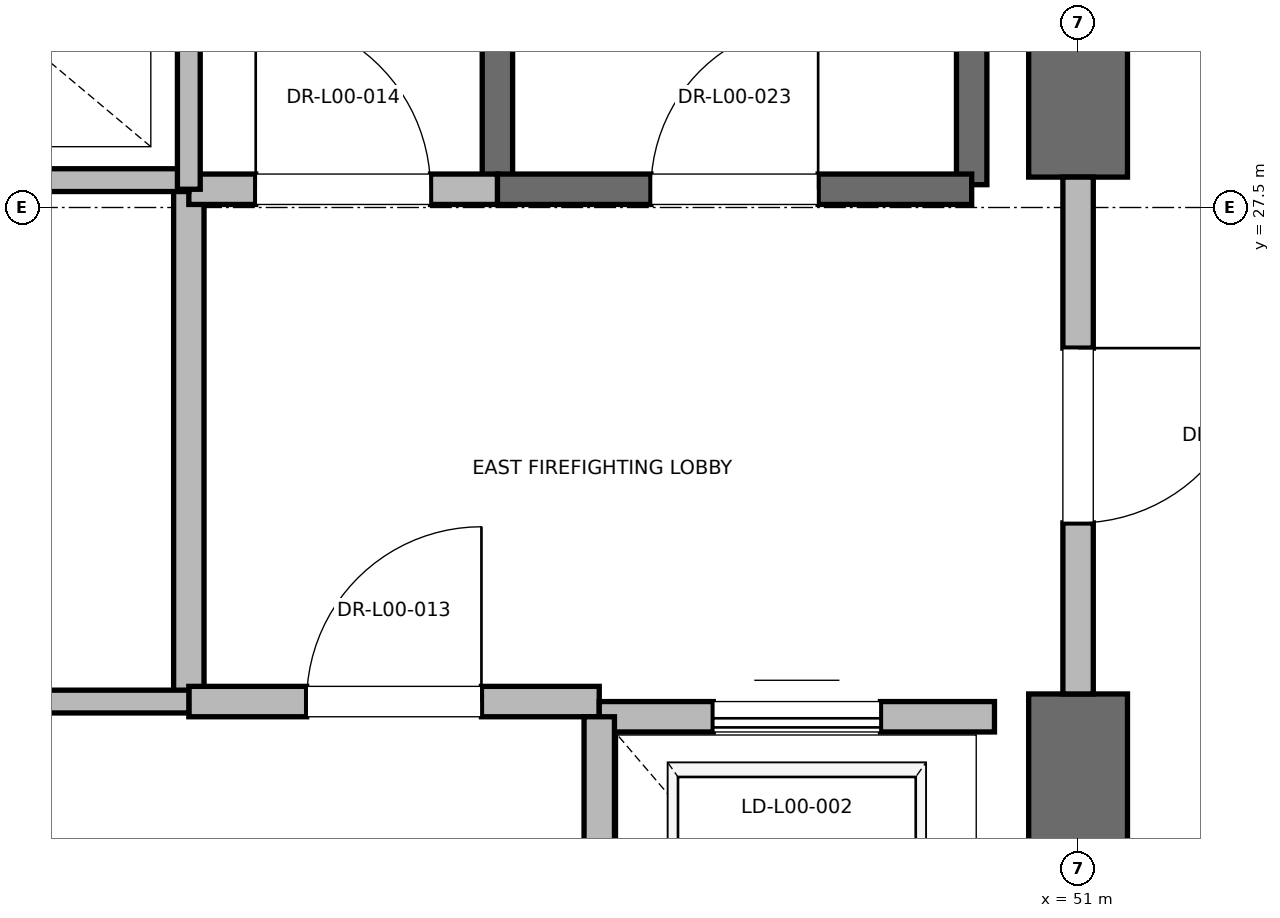
"""IFC4 building model, lengths in metres.
Left out: names, types, materials, properties, quantities, classifications, styles, units other than length and angle.
Written with IfcOpenShell. Run it as: python <this file> out.ifc"""

import sys

from ifc_helpers import new_model, si_unit, direction, frame, frame_2d, origin, place, context, subcontext, project, spatial, rectangle, extrude, element, fill, save


model = new_model("IFC4")
c1 = context("Model", 3, precision=1e-05, world=origin(), true_north=direction((0.0, 1.0)))
c2 = subcontext(c1, "Body", "Model", "MODEL_VIEW")
j1 = project(units=[si_unit("LENGTHUNIT", "METRE"), si_unit("PLANEANGLEUNIT", "RADIAN")], contexts=[c1])
p1 = place(None, origin())
s1 = spatial("IfcSite", under=j1, at=p1, CompositionType="ELEMENT")
p2 = place(p1, origin())
s2 = spatial("IfcBuilding", under=s1, at=p2, CompositionType="ELEMENT")
p3 = place(p2, origin())
s3 = spatial("IfcBuildingStorey", under=s2, at=p3, CompositionType="ELEMENT", Elevation=0.0)
p4 = place(p3, frame((51.0, 18.5, 0.0), z_axis=(0.0, 0.0, 1.0), x_axis=(0.0, 1.0, 0.0)))
e1 = element("IfcWall", 1, at=p4, inside=s3, PredefinedType="SHEAR", context=c2, shape_type="SweptSolid", body=[
    extrude(rectangle(XDim=5.8, YDim=0.65, at=frame_2d((2.9, 0.0))), origin(), (0.0, 0.0, 1.0), 5.72),
])
p5 = place(p3, frame((51.0, 27.7, 0.0), z_axis=(0.0, 0.0, 1.0), x_axis=(0.0, 1.0, 0.0)))
e2 = element("IfcWall", 2, at=p5, inside=s3, PredefinedType="SHEAR", context=c2, shape_type="SweptSolid", body=[
    extrude(rectangle(XDim=8.8, YDim=0.65, at=frame_2d((4.4, 0.0))), origin(), (0.0, 0.0, 1.0), 5.72),
])
p6 = place(p3, frame((50.3, 27.65, 0.0), z_axis=(0.0, 0.0, 1.0), x_axis=(0.0, 1.0, 0.0)))
e3 = element("IfcWall", 3, at=p6, inside=s3, PredefinedType="SOLIDWALL", context=c2, shape_type="SweptSolid", body=[
    extrude(rectangle(XDim=8.15, YDim=0.2, at=frame_2d((4.075, 0.0))), origin(), (0.0, 0.0, 1.0), 5.72),
])
p7 = place(p3, frame((47.18, 27.62, 0.0), z_axis=(0.0, 0.0, 1.0), x_axis=(0.0, 1.0, 0.0)))
e4 = element("IfcWall", 4, at=p7, inside=s3, PredefinedType="SOLIDWALL", context=c2, shape_type="SweptSolid", body=[
    extrude(rectangle(XDim=8.18, YDim=0.2, at=frame_2d((4.09, 0.0))), origin(), (0.0, 0.0, 1.0), 5.72),
])
p8 = place(p3, frame((47.18, 27.62, 0.0), z_axis=(0.0, 0.0, 1.0), x_axis=(1.0, 0.0, 0.0)))
e5 = element("IfcWall", 5, at=p8, inside=s3, PredefinedType="SOLIDWALL", context=c2, shape_type="SweptSolid", body=[
    extrude(rectangle(XDim=3.12, YDim=0.2, at=frame_2d((1.56, 0.0))), origin(), (0.0, 0.0, 1.0), 5.72),
])
p9 = place(p8, frame((1.01, 0.0, 0.0)))
e6 = element("IfcOpeningElement", 6, at=p9, cuts=e5, PredefinedType="OPENING", context=c2, shape_type="SweptSolid", body=[
    extrude(rectangle(XDim=1.1, YDim=2.15, at=frame_2d((0.55, 1.075))), frame((0.0, 0.1, 0.0), z_axis=(0.0, -1.0, 0.0), x_axis=(1.0, 0.0, 0.0)), (0.0, 0.0, 1.0), 0.2),
])
p10 = place(p3, frame((45.15, 24.25, 0.0), z_axis=(0.0, 0.0, 1.0), x_axis=(0.0, 1.0, 0.0)))
e7 = element("IfcWall", 7, at=p10, inside=s3, PredefinedType="PARTITIONING", context=c2, shape_type="SweptSolid", body=[
    extrude(rectangle(XDim=3.37, YDim=0.2, at=frame_2d((1.685, 0.0))), origin(), (0.0, 0.0, 1.0), 5.72),
])
p11 = place(p3, frame((45.15, 24.25, 0.0), z_axis=(0.0, 0.0, 1.0), x_axis=(1.0, 0.0, 0.0)))
e8 = element("IfcWall", 8, at=p11, inside=s3, PredefinedType="PARTITIONING", context=c2, shape_type="SweptSolid", body=[
    extrude(rectangle(XDim=2.7, YDim=0.2, at=frame_2d((1.35, 0.0))), origin(), (0.0, 0.0, 1.0), 5.72),
])
p12 = place(p11, frame((0.775, 0.0, 0.0)))
e9 = element("IfcOpeningElement", 9, at=p12, cuts=e8, PredefinedType="OPENING", context=c2, shape_type="SweptSolid", body=[
    extrude(rectangle(XDim=1.15, YDim=2.2, at=frame_2d((0.575, 1.1))), frame((0.0, 0.1, 0.0), z_axis=(0.0, -1.0, 0.0), x_axis=(1.0, 0.0, 0.0)), (0.0, 0.0, 1.0), 0.2),
])
p13 = place(p3, frame((45.15, 27.62, 0.0), z_axis=(0.0, 0.0, 1.0), x_axis=(1.0, 0.0, 0.0)))
e10 = element("IfcWall", 10, at=p13, inside=s3, PredefinedType="PARTITIONING", context=c2, shape_type="SweptSolid", body=[
    extrude(rectangle(XDim=2.03, YDim=0.2, at=frame_2d((1.015, 0.0))), origin(), (0.0, 0.0, 1.0), 5.72),
])
p14 = place(p13, frame((0.44, 0.0, 0.0)))
e11 = element("IfcOpeningElement", 11, at=p14, cuts=e10, PredefinedType="OPENING", context=c2, shape_type="SweptSolid", body=[
    extrude(rectangle(XDim=1.15, YDim=2.2, at=frame_2d((0.575, 1.1))), frame((0.0, 0.1, 0.0), z_axis=(0.0, -1.0, 0.0), x_axis=(1.0, 0.0, 0.0)), (0.0, 0.0, 1.0), 0.2),
])
p15 = place(p3, frame((51.0, 27.7, 0.0), z_axis=(0.0, 0.0, 1.0), x_axis=(0.0, -1.0, 0.0)))
e12 = element("IfcWall", 12, at=p15, inside=s3, PredefinedType="PARTITIONING", context=c2, shape_type="SweptSolid", body=[
    extrude(rectangle(XDim=3.4, YDim=0.2, at=frame_2d((1.7, 0.0))), origin(), (0.0, 0.0, 1.0), 4.5),
])
p16 = place(p15, frame((1.125, 0.0, 0.0)))
e13 = element("IfcOpeningElement", 13, at=p16, cuts=e12, PredefinedType="OPENING", context=c2, shape_type="SweptSolid", body=[
    extrude(rectangle(XDim=1.15, YDim=2.2, at=frame_2d((0.575, 1.1))), frame((0.0, 0.1, 0.0), z_axis=(0.0, -1.0, 0.0), x_axis=(1.0, 0.0, 0.0)), (0.0, 0.0, 1.0), 0.2),
])
p17 = place(p3, frame((50.45, 24.15, 0.0), z_axis=(0.0, 0.0, 1.0), x_axis=(-1.0, 0.0, 0.0)))
e14 = element("IfcWall", 14, at=p17, inside=s3, PredefinedType="SOLIDWALL", context=c2, shape_type="SweptSolid", body=[
    extrude(rectangle(XDim=2.6, YDim=0.2, at=frame_2d((1.3, 0.0))), origin(), (0.0, 0.0, 1.0), 4.5),
])
p18 = place(p17, frame((0.75, 0.0, 0.0)))
e15 = element("IfcOpeningElement", 15, at=p18, cuts=e14, PredefinedType="OPENING", context=c2, shape_type="SweptSolid", body=[
    extrude(rectangle(XDim=1.1, YDim=2.2, at=frame_2d((0.55, 1.1))), frame((0.0, 0.1, 0.0), z_axis=(0.0, -1.0, 0.0), x_axis=(1.0, 0.0, 0.0)), (0.0, 0.0, 1.0), 0.2),
])
p19 = place(p3, frame((47.85, 24.15, 0.0), z_axis=(0.0, 0.0, 1.0), x_axis=(0.0, -1.0, 0.0)))
e16 = element("IfcWall", 16, at=p19, inside=s3, PredefinedType="SOLIDWALL", context=c2, shape_type="SweptSolid", body=[
    extrude(rectangle(XDim=3.0, YDim=0.2, at=frame_2d((1.5, 0.0))), origin(), (0.0, 0.0, 1.0), 5.72),
])
p20 = place(p3, frame((41.56, 27.68, 0.0), z_axis=(0.0, 0.0, 1.0), x_axis=(1.0, 0.0, 0.0)))
e17 = element("IfcWall", 17, at=p20, inside=s3, PredefinedType="PARTITIONING", context=c2, shape_type="SweptSolid", body=[
    extrude(rectangle(XDim=3.59, YDim=0.15, at=frame_2d((1.795, 0.0))), origin(), (0.0, 0.0, 1.0), 2.85),
])
p21 = place(p3, frame((41.76, 24.25, 0.0), z_axis=(0.0, 0.0, 1.0), x_axis=(1.0, 0.0, 0.0)))
e18 = element("IfcWall", 18, at=p21, inside=s3, PredefinedType="PARTITIONING", context=c2, shape_type="SweptSolid", body=[
    extrude(rectangle(XDim=3.39, YDim=0.15, at=frame_2d((1.695, 0.0))), origin(), (0.0, 0.0, 1.0), 2.85),
])
p22 = place(p21, frame((1.195, 0.0, 0.0)))
e19 = element("IfcOpeningElement", 19, at=p22, cuts=e18, PredefinedType="OPENING", context=c2, shape_type="SweptSolid", body=[
    extrude(rectangle(XDim=1.0, YDim=2.15, at=frame_2d((0.5, 1.075))), frame((0.0, 0.075, 0.0), z_axis=(0.0, -1.0, 0.0), x_axis=(1.0, 0.0, 0.0)), (0.0, 0.0, 1.0), 0.15),
])
p23 = place(p3, frame((45.15, 27.62, 0.0), z_axis=(0.0, 0.0, 1.0), x_axis=(0.0, 1.0, 0.0)))
e20 = element("IfcWall", 20, at=p23, inside=s3, PredefinedType="PARTITIONING", context=c2, shape_type="SweptSolid", body=[
    extrude(rectangle(XDim=3.1, YDim=0.15, at=frame_2d((1.55, 0.0))), origin(), (0.0, 0.0, 1.0), 2.85),
])
p24 = place(p9, origin())
e21 = element("IfcDoor", 21, at=p24, inside=s3, OperationType="SINGLE_SWING_RIGHT", PredefinedType="DOOR", context=c2, shape_type="SweptSolid", body=[
    extrude(rectangle(XDim=1.1, YDim=2.15, at=frame_2d((0.55, 1.075))), frame((0.0, 0.025, 0.0), z_axis=(0.0, -1.0, 0.0), x_axis=(1.0, 0.0, 0.0)), (0.0, 0.0, 1.0), 0.05),
])
fill(e6, e21)
p25 = place(p12, origin())
e22 = element("IfcDoor", 22, at=p25, inside=s3, OperationType="SINGLE_SWING_RIGHT", PredefinedType="DOOR", context=c2, shape_type="SweptSolid", body=[
    extrude(rectangle(XDim=1.15, YDim=2.2, at=frame_2d((0.575, 1.1))), frame((0.0, 0.025, 0.0), z_axis=(0.0, -1.0, 0.0), x_axis=(1.0, 0.0, 0.0)), (0.0, 0.0, 1.0), 0.05),
])
fill(e9, e22)
p26 = place(p14, origin())
e23 = element("IfcDoor", 23, at=p26, inside=s3, OperationType="SINGLE_SWING_LEFT", PredefinedType="DOOR", context=c2, shape_type="SweptSolid", body=[
    extrude(rectangle(XDim=1.15, YDim=2.2, at=frame_2d((0.575, 1.1))), frame((0.0, 0.025, 0.0), z_axis=(0.0, -1.0, 0.0), x_axis=(1.0, 0.0, 0.0)), (0.0, 0.0, 1.0), 0.05),
])
fill(e11, e23)
p27 = place(p16, origin())
e24 = element("IfcDoor", 24, at=p27, inside=s3, OperationType="SINGLE_SWING_LEFT", PredefinedType="DOOR", context=c2, shape_type="SweptSolid", body=[
    extrude(rectangle(XDim=1.15, YDim=2.2, at=frame_2d((0.575, 1.1))), frame((0.0, 0.025, 0.0), z_axis=(0.0, -1.0, 0.0), x_axis=(1.0, 0.0, 0.0)), (0.0, 0.0, 1.0), 0.05),
])
fill(e13, e24)
p28 = place(p18, origin())
e25 = element("IfcDoor", 25, at=p28, inside=s3, OperationType="SLIDING_TO_RIGHT", PredefinedType="DOOR", context=c2, shape_type="SweptSolid", body=[
    extrude(rectangle(XDim=1.1, YDim=2.2, at=frame_2d((0.55, 1.1))), frame((0.0, 0.025, 0.0), z_axis=(0.0, -1.0, 0.0), x_axis=(1.0, 0.0, 0.0)), (0.0, 0.0, 1.0), 0.05),
])
fill(e15, e25)
save(model, sys.argv[1])
